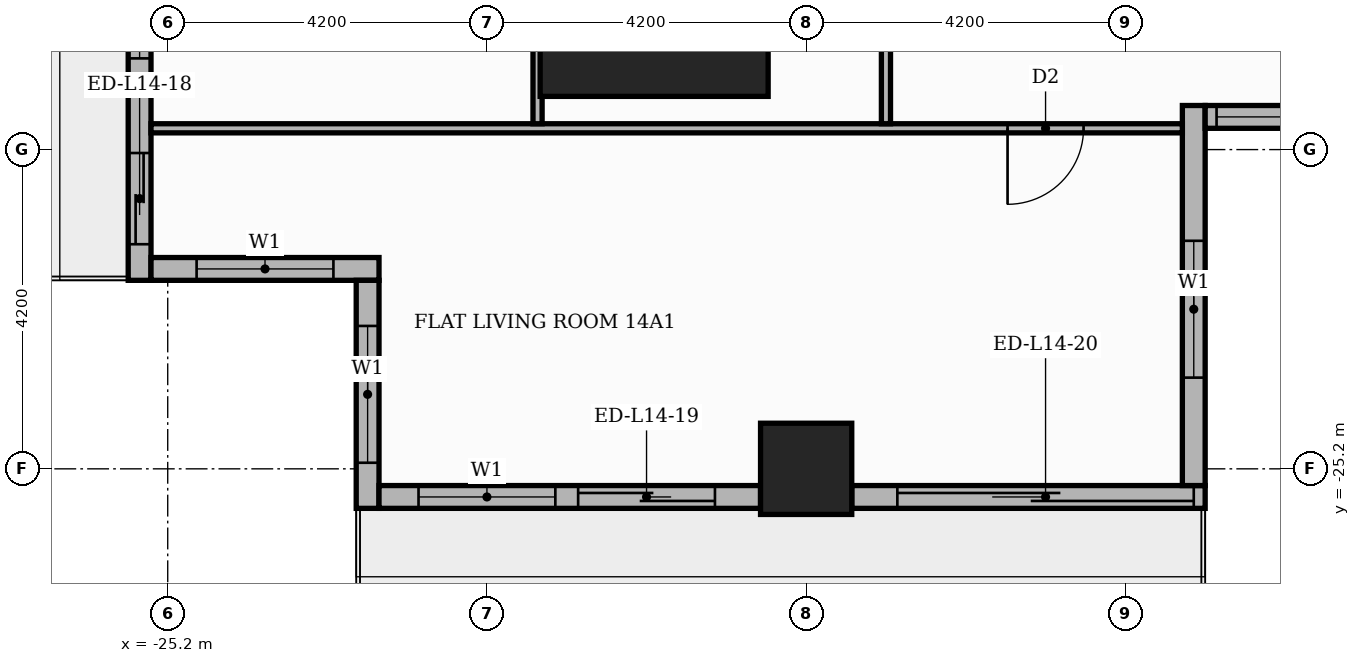
"""IFC4 building model, lengths in metres.
Left out: names, types, materials, properties, quantities, classifications, styles, units other than length and angle.
Written with IfcOpenShell. Run it as: python <this file> out.ifc"""

import sys

from ifc_helpers import new_model, si_unit, direction, frame, frame_2d, origin, origin_2d, place, context, subcontext, project, spatial, rectangle, extrude, element, fill, save


model = new_model("IFC4")
c1 = context("Model", 3, precision=1e-05, world=origin(), true_north=direction((0.0, 1.0)))
c2 = subcontext(c1, "Body", "Model", "MODEL_VIEW")
j1 = project(units=[si_unit("LENGTHUNIT", "METRE"), si_unit("PLANEANGLEUNIT", "RADIAN")], contexts=[c1])
p1 = place(None, origin())
s1 = spatial("IfcSite", under=j1, at=p1, CompositionType="ELEMENT")
p2 = place(p1, origin())
s2 = spatial("IfcBuilding", under=s1, at=p2, CompositionType="ELEMENT")
p3 = place(p2, frame((0.0, 0.0, 62.1)))
s3 = spatial("IfcBuildingStorey", under=s2, at=p3, CompositionType="ELEMENT", Elevation=62.1)
p4 = place(p3, frame((-18.8, -18.8, 0.0), z_axis=(0.0, 0.0, 1.0), x_axis=(1.0, 0.0, 0.0)))
e1 = element("IfcColumn", 1, at=p4, inside=s3, PredefinedType="COLUMN", context=c2, shape_type="SweptSolid", body=[
    extrude(rectangle(XDim=3.0, YDim=3.0, at=origin_2d()), origin(), (0.0, 0.0, 1.0), 3.9),
])
p5 = place(p3, frame((-16.8, -25.2, 0.0), z_axis=(0.0, 0.0, 1.0), x_axis=(1.0, 0.0, 0.0)))
e2 = element("IfcColumn", 2, at=p5, inside=s3, PredefinedType="COLUMN", context=c2, shape_type="SweptSolid", body=[
    extrude(rectangle(XDim=1.2, YDim=1.2, at=origin_2d()), origin(), (0.0, 0.0, 1.0), 3.9),
])
p6 = place(p3, frame((-25.57, -17.4, 0.0), z_axis=(0.0, 0.0, 1.0), x_axis=(0.0, -1.0, 0.0)))
e3 = element("IfcWall", 3, at=p6, inside=s3, PredefinedType="STANDARD", context=c2, shape_type="SweptSolid", body=[
    extrude(rectangle(XDim=5.32, YDim=0.3, at=frame_2d((2.66, 0.0))), origin(), (0.0, 0.0, 1.0), 3.48),
])
p7 = place(p6, frame((0.6, 0.0, 0.9)))
e4 = element("IfcOpeningElement", 4, at=p7, cuts=e3, PredefinedType="OPENING", context=c2, shape_type="SweptSolid", body=[
    extrude(rectangle(XDim=1.8, YDim=2.1, at=frame_2d((0.9, 1.05))), frame((0.0, 0.16, 0.0), z_axis=(0.0, -1.0, 0.0), x_axis=(1.0, 0.0, 0.0)), (0.0, 0.0, 1.0), 0.32),
])
p8 = place(p6, frame((3.645, 0.0, 0.0)))
e5 = element("IfcOpeningElement", 5, at=p8, cuts=e3, PredefinedType="OPENING", context=c2, shape_type="SweptSolid", body=[
    extrude(rectangle(XDim=1.2, YDim=2.4, at=frame_2d((0.6, 1.2))), frame((0.0, 0.16, 0.0), z_axis=(0.0, -1.0, 0.0), x_axis=(1.0, 0.0, 0.0)), (0.0, 0.0, 1.0), 0.32),
])
p9 = place(p3, frame((-25.42, -22.57, 0.0), z_axis=(0.0, 0.0, 1.0), x_axis=(1.0, 0.0, 0.0)))
e6 = element("IfcWall", 6, at=p9, inside=s3, PredefinedType="STANDARD", context=c2, shape_type="SweptSolid", body=[
    extrude(rectangle(XDim=3.0, YDim=0.3, at=frame_2d((1.5, 0.0))), origin(), (0.0, 0.0, 1.0), 3.48),
])
p10 = place(p9, frame((0.6, 0.0, 0.9)))
e7 = element("IfcOpeningElement", 7, at=p10, cuts=e6, PredefinedType="OPENING", context=c2, shape_type="SweptSolid", body=[
    extrude(rectangle(XDim=1.8, YDim=2.1, at=frame_2d((0.9, 1.05))), frame((0.0, 0.16, 0.0), z_axis=(0.0, -1.0, 0.0), x_axis=(1.0, 0.0, 0.0)), (0.0, 0.0, 1.0), 0.32),
])
p11 = place(p3, frame((-22.57, -22.72, 0.0), z_axis=(0.0, 0.0, 1.0), x_axis=(0.0, -1.0, 0.0)))
e8 = element("IfcWall", 8, at=p11, inside=s3, PredefinedType="STANDARD", context=c2, shape_type="SweptSolid", body=[
    extrude(rectangle(XDim=3.0, YDim=0.3, at=frame_2d((1.5, 0.0))), origin(), (0.0, 0.0, 1.0), 3.48),
])
p12 = place(p11, frame((0.6, 0.0, 0.9)))
e9 = element("IfcOpeningElement", 9, at=p12, cuts=e8, PredefinedType="OPENING", context=c2, shape_type="SweptSolid", body=[
    extrude(rectangle(XDim=1.8, YDim=2.1, at=frame_2d((0.9, 1.05))), frame((0.0, 0.16, 0.0), z_axis=(0.0, -1.0, 0.0), x_axis=(1.0, 0.0, 0.0)), (0.0, 0.0, 1.0), 0.32),
])
p13 = place(p3, frame((-22.42, -25.57, 0.0), z_axis=(0.0, 0.0, 1.0), x_axis=(1.0, 0.0, 0.0)))
e10 = element("IfcWall", 10, at=p13, inside=s3, PredefinedType="STANDARD", context=c2, shape_type="SweptSolid", body=[
    extrude(rectangle(XDim=5.02, YDim=0.3, at=frame_2d((2.51, 0.0))), origin(), (0.0, 0.0, 1.0), 3.48),
])
p14 = place(p13, frame((0.52, 0.0, 0.9)))
e11 = element("IfcOpeningElement", 11, at=p14, cuts=e10, PredefinedType="OPENING", context=c2, shape_type="SweptSolid", body=[
    extrude(rectangle(XDim=1.8, YDim=2.1, at=frame_2d((0.9, 1.05))), frame((0.0, 0.16, 0.0), z_axis=(0.0, -1.0, 0.0), x_axis=(1.0, 0.0, 0.0)), (0.0, 0.0, 1.0), 0.32),
])
p15 = place(p13, frame((2.62, 0.0, 0.0)))
e12 = element("IfcOpeningElement", 12, at=p15, cuts=e10, PredefinedType="OPENING", context=c2, shape_type="SweptSolid", body=[
    extrude(rectangle(XDim=1.8, YDim=2.4, at=frame_2d((0.9, 1.2))), frame((0.0, 0.16, 0.0), z_axis=(0.0, -1.0, 0.0), x_axis=(1.0, 0.0, 0.0)), (0.0, 0.0, 1.0), 0.32),
])
p16 = place(p3, frame((-16.2, -25.57, 0.0), z_axis=(0.0, 0.0, 1.0), x_axis=(1.0, 0.0, 0.0)))
e13 = element("IfcWall", 13, at=p16, inside=s3, PredefinedType="STANDARD", context=c2, shape_type="SweptSolid", body=[
    extrude(rectangle(XDim=4.65, YDim=0.3, at=frame_2d((2.325, 0.0))), origin(), (0.0, 0.0, 1.0), 3.48),
])
p17 = place(p16, frame((0.6, 0.0, 0.0)))
e14 = element("IfcOpeningElement", 14, at=p17, cuts=e13, PredefinedType="OPENING", context=c2, shape_type="SweptSolid", body=[
    extrude(rectangle(XDim=3.9, YDim=2.4, at=frame_2d((1.95, 1.2))), frame((0.0, 0.16, 0.0), z_axis=(0.0, -1.0, 0.0), x_axis=(1.0, 0.0, 0.0)), (0.0, 0.0, 1.0), 0.32),
])
p18 = place(p3, frame((-11.7, -25.42, 0.0), z_axis=(0.0, 0.0, 1.0), x_axis=(0.0, 1.0, 0.0)))
e15 = element("IfcWall", 15, at=p18, inside=s3, PredefinedType="STANDARD", context=c2, shape_type="SweptSolid", body=[
    extrude(rectangle(XDim=5.0, YDim=0.3, at=frame_2d((2.5, 0.0))), origin(), (0.0, 0.0, 1.0), 3.48),
])
p19 = place(p18, frame((1.42, 0.0, 0.9)))
e16 = element("IfcOpeningElement", 16, at=p19, cuts=e15, PredefinedType="OPENING", context=c2, shape_type="SweptSolid", body=[
    extrude(rectangle(XDim=1.8, YDim=2.1, at=frame_2d((0.9, 1.05))), frame((0.0, 0.16, 0.0), z_axis=(0.0, -1.0, 0.0), x_axis=(1.0, 0.0, 0.0)), (0.0, 0.0, 1.0), 0.32),
])
p20 = place(p3, frame((-11.55, -20.57, 0.0), z_axis=(0.0, 0.0, 1.0), x_axis=(1.0, 0.0, 0.0)))
e17 = element("IfcWall", 17, at=p20, inside=s3, PredefinedType="STANDARD", context=c2, shape_type="SweptSolid", body=[
    extrude(rectangle(XDim=23.4, YDim=0.3, at=frame_2d((11.7, 0.0))), origin(), (0.0, 0.0, 1.0), 3.48),
])
p21 = place(p20, frame((0.15, 0.0, 0.9)))
e18 = element("IfcOpeningElement", 18, at=p21, cuts=e17, PredefinedType="OPENING", context=c2, shape_type="SweptSolid", body=[
    extrude(rectangle(XDim=6.0, YDim=2.1, at=frame_2d((3.0, 1.05))), frame((0.0, 0.16, 0.0), z_axis=(0.0, -1.0, 0.0), x_axis=(1.0, 0.0, 0.0)), (0.0, 0.0, 1.0), 0.32),
])
p22 = place(p20, frame((6.45, 0.0, 0.9)))
e19 = element("IfcOpeningElement", 19, at=p22, cuts=e17, PredefinedType="OPENING", context=c2, shape_type="SweptSolid", body=[
    extrude(rectangle(XDim=6.0, YDim=2.1, at=frame_2d((3.0, 1.05))), frame((0.0, 0.16, 0.0), z_axis=(0.0, -1.0, 0.0), x_axis=(1.0, 0.0, 0.0)), (0.0, 0.0, 1.0), 0.32),
])
p23 = place(p20, frame((12.75, 0.0, 0.9)))
e20 = element("IfcOpeningElement", 20, at=p23, cuts=e17, PredefinedType="OPENING", context=c2, shape_type="SweptSolid", body=[
    extrude(rectangle(XDim=6.0, YDim=2.1, at=frame_2d((3.0, 1.05))), frame((0.0, 0.16, 0.0), z_axis=(0.0, -1.0, 0.0), x_axis=(1.0, 0.0, 0.0)), (0.0, 0.0, 1.0), 0.32),
])
p24 = place(p20, frame((19.05, 0.0, 0.9)))
e21 = element("IfcOpeningElement", 21, at=p24, cuts=e17, PredefinedType="OPENING", context=c2, shape_type="SweptSolid", body=[
    extrude(rectangle(XDim=3.9, YDim=2.1, at=frame_2d((1.95, 1.05))), frame((0.0, 0.16, 0.0), z_axis=(0.0, -1.0, 0.0), x_axis=(1.0, 0.0, 0.0)), (0.0, 0.0, 1.0), 0.32),
])
p25 = place(p3, frame((-25.42, -20.72, 0.0), z_axis=(0.0, 0.0, 1.0), x_axis=(1.0, 0.0, 0.0)))
e22 = element("IfcWall", 22, at=p25, inside=s3, PredefinedType="PARTITIONING", context=c2, shape_type="SweptSolid", body=[
    extrude(rectangle(XDim=13.57, YDim=0.12, at=frame_2d((6.785, 0.0))), origin(), (0.0, 0.0, 1.0), 3.48),
])
p26 = place(p25, frame((11.27, 0.0, 0.0)))
e23 = element("IfcOpeningElement", 23, at=p26, cuts=e22, PredefinedType="OPENING", context=c2, shape_type="SweptSolid", body=[
    extrude(rectangle(XDim=1.0, YDim=2.1, at=frame_2d((0.5, 1.05))), frame((0.0, 0.07, 0.0), z_axis=(0.0, -1.0, 0.0), x_axis=(1.0, 0.0, 0.0)), (0.0, 0.0, 1.0), 0.14),
])
p27 = place(p3, frame((-20.334, -20.66, 0.0), z_axis=(0.0, 0.0, 1.0), x_axis=(0.0, 1.0, 0.0)))
e24 = element("IfcWall", 24, at=p27, inside=s3, PredefinedType="PARTITIONING", context=c2, shape_type="SweptSolid", body=[
    extrude(rectangle(XDim=6.91, YDim=0.12, at=frame_2d((3.455, 0.0))), origin(), (0.0, 0.0, 1.0), 3.48),
])
p28 = place(p27, frame((4.792, 0.0, 0.0)))
e25 = element("IfcOpeningElement", 25, at=p28, cuts=e24, PredefinedType="OPENING", context=c2, shape_type="SweptSolid", body=[
    extrude(rectangle(XDim=0.9, YDim=2.1, at=frame_2d((0.45, 1.05))), frame((0.0, 0.07, 0.0), z_axis=(0.0, -1.0, 0.0), x_axis=(1.0, 0.0, 0.0)), (0.0, 0.0, 1.0), 0.14),
])
p29 = place(p3, frame((-15.75, -20.66, 0.0), z_axis=(0.0, 0.0, 1.0), x_axis=(0.0, 1.0, 0.0)))
e26 = element("IfcWall", 26, at=p29, inside=s3, PredefinedType="PARTITIONING", context=c2, shape_type="SweptSolid", body=[
    extrude(rectangle(XDim=6.91, YDim=0.12, at=frame_2d((3.455, 0.0))), origin(), (0.0, 0.0, 1.0), 3.48),
])
p30 = place(p29, frame((2.975, 0.0, 0.0)))
e27 = element("IfcOpeningElement", 27, at=p30, cuts=e26, PredefinedType="OPENING", context=c2, shape_type="SweptSolid", body=[
    extrude(rectangle(XDim=1.0, YDim=2.1, at=frame_2d((0.5, 1.05))), frame((0.0, 0.07, 0.0), z_axis=(0.0, -1.0, 0.0), x_axis=(1.0, 0.0, 0.0)), (0.0, 0.0, 1.0), 0.14),
])
p31 = place(p7, origin())
e28 = element("IfcWindow", 28, at=p31, inside=s3, PartitioningType="SINGLE_PANEL", PredefinedType="WINDOW", context=c2, shape_type="SweptSolid", body=[
    extrude(rectangle(XDim=1.8, YDim=2.1, at=frame_2d((0.9, 1.05))), frame((0.0, 0.03, 0.0), z_axis=(0.0, -1.0, 0.0), x_axis=(1.0, 0.0, 0.0)), (0.0, 0.0, 1.0), 0.06),
])
fill(e4, e28)
p32 = place(p8, origin())
e29 = element("IfcDoor", 29, at=p32, inside=s3, OperationType="SLIDING_TO_RIGHT", PredefinedType="DOOR", context=c2, shape_type="SweptSolid", body=[
    extrude(rectangle(XDim=1.2, YDim=2.4, at=frame_2d((0.6, 1.2))), frame((0.0, 0.025, 0.0), z_axis=(0.0, -1.0, 0.0), x_axis=(1.0, 0.0, 0.0)), (0.0, 0.0, 1.0), 0.05),
])
fill(e5, e29)
p33 = place(p10, origin())
e30 = element("IfcWindow", 30, at=p33, inside=s3, PartitioningType="SINGLE_PANEL", PredefinedType="WINDOW", context=c2, shape_type="SweptSolid", body=[
    extrude(rectangle(XDim=1.8, YDim=2.1, at=frame_2d((0.9, 1.05))), frame((0.0, 0.03, 0.0), z_axis=(0.0, -1.0, 0.0), x_axis=(1.0, 0.0, 0.0)), (0.0, 0.0, 1.0), 0.06),
])
fill(e7, e30)
p34 = place(p12, origin())
e31 = element("IfcWindow", 31, at=p34, inside=s3, PartitioningType="SINGLE_PANEL", PredefinedType="WINDOW", context=c2, shape_type="SweptSolid", body=[
    extrude(rectangle(XDim=1.8, YDim=2.1, at=frame_2d((0.9, 1.05))), frame((0.0, 0.03, 0.0), z_axis=(0.0, -1.0, 0.0), x_axis=(1.0, 0.0, 0.0)), (0.0, 0.0, 1.0), 0.06),
])
fill(e9, e31)
p35 = place(p14, origin())
e32 = element("IfcWindow", 32, at=p35, inside=s3, PartitioningType="SINGLE_PANEL", PredefinedType="WINDOW", context=c2, shape_type="SweptSolid", body=[
    extrude(rectangle(XDim=1.8, YDim=2.1, at=frame_2d((0.9, 1.05))), frame((0.0, 0.03, 0.0), z_axis=(0.0, -1.0, 0.0), x_axis=(1.0, 0.0, 0.0)), (0.0, 0.0, 1.0), 0.06),
])
fill(e11, e32)
p36 = place(p15, origin())
e33 = element("IfcDoor", 33, at=p36, inside=s3, OperationType="SLIDING_TO_RIGHT", PredefinedType="DOOR", context=c2, shape_type="SweptSolid", body=[
    extrude(rectangle(XDim=1.8, YDim=2.4, at=frame_2d((0.9, 1.2))), frame((0.0, 0.025, 0.0), z_axis=(0.0, -1.0, 0.0), x_axis=(1.0, 0.0, 0.0)), (0.0, 0.0, 1.0), 0.05),
])
fill(e12, e33)
p37 = place(p17, origin())
e34 = element("IfcDoor", 34, at=p37, inside=s3, OperationType="SLIDING_TO_LEFT", PredefinedType="DOOR", context=c2, shape_type="SweptSolid", body=[
    extrude(rectangle(XDim=3.9, YDim=2.4, at=frame_2d((1.95, 1.2))), frame((0.0, 0.025, 0.0), z_axis=(0.0, -1.0, 0.0), x_axis=(1.0, 0.0, 0.0)), (0.0, 0.0, 1.0), 0.05),
])
fill(e14, e34)
p38 = place(p19, origin())
e35 = element("IfcWindow", 35, at=p38, inside=s3, PartitioningType="SINGLE_PANEL", PredefinedType="WINDOW", context=c2, shape_type="SweptSolid", body=[
    extrude(rectangle(XDim=1.8, YDim=2.1, at=frame_2d((0.9, 1.05))), frame((0.0, 0.03, 0.0), z_axis=(0.0, -1.0, 0.0), x_axis=(1.0, 0.0, 0.0)), (0.0, 0.0, 1.0), 0.06),
])
fill(e16, e35)
p39 = place(p21, origin())
e36 = element("IfcWindow", 36, at=p39, inside=s3, PartitioningType="SINGLE_PANEL", PredefinedType="WINDOW", context=c2, shape_type="SweptSolid", body=[
    extrude(rectangle(XDim=6.0, YDim=2.1, at=frame_2d((3.0, 1.05))), frame((0.0, 0.03, 0.0), z_axis=(0.0, -1.0, 0.0), x_axis=(1.0, 0.0, 0.0)), (0.0, 0.0, 1.0), 0.06),
])
fill(e18, e36)
p40 = place(p26, frame((1.0, 0.0, 0.0), z_axis=(0.0, 0.0, 1.0), x_axis=(-1.0, 0.0, 0.0)))
e37 = element("IfcDoor", 37, at=p40, inside=s3, OperationType="SINGLE_SWING_LEFT", PredefinedType="DOOR", context=c2, shape_type="SweptSolid", body=[
    extrude(rectangle(XDim=1.0, YDim=2.1, at=frame_2d((0.5, 1.05))), frame((0.0, 0.025, 0.0), z_axis=(0.0, -1.0, 0.0), x_axis=(1.0, 0.0, 0.0)), (0.0, 0.0, 1.0), 0.05),
])
fill(e23, e37)
save(model, sys.argv[1])
